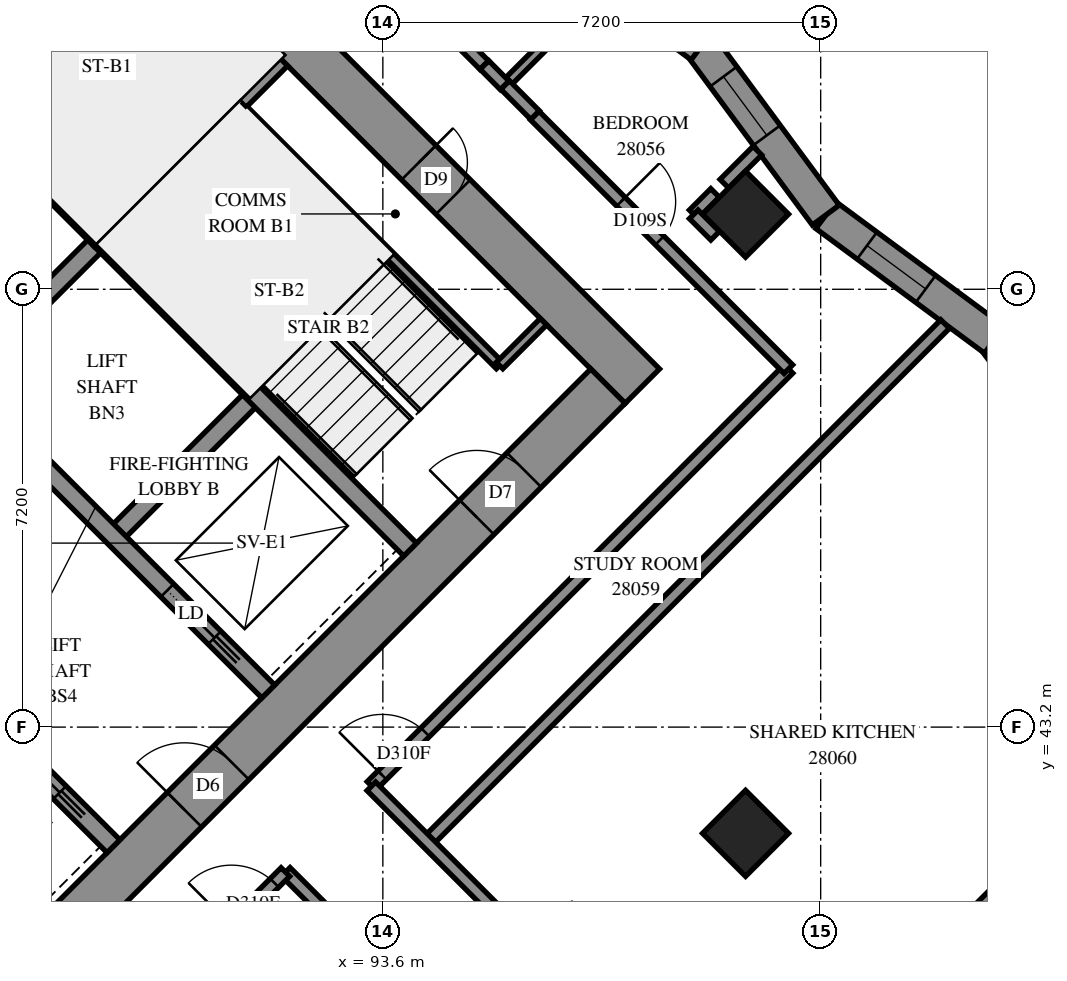
"""IFC4 building model, lengths in metres.
Left out: names, types, materials, properties, quantities, classifications, styles, units other than length and angle.
Written with IfcOpenShell. Run it as: python <this file> out.ifc"""

import sys

from ifc_helpers import new_model, si_unit, direction, frame, frame_2d, origin, origin_2d, place, context, subcontext, project, spatial, polyline, rectangle, outline, extrude, element, fill, save


model = new_model("IFC4")
c1 = context("Model", 3, precision=1e-05, world=origin(), true_north=direction((0.0, 1.0)))
c2 = subcontext(c1, "Body", "Model", "MODEL_VIEW")
j1 = project(units=[si_unit("LENGTHUNIT", "METRE"), si_unit("PLANEANGLEUNIT", "RADIAN")], contexts=[c1])
p1 = place(None, origin())
s1 = spatial("IfcSite", under=j1, at=p1, CompositionType="ELEMENT")
p2 = place(p1, origin())
s2 = spatial("IfcBuilding", under=s1, at=p2, CompositionType="ELEMENT")
p3 = place(p2, frame((0.0, 0.0, 105.0)))
s3 = spatial("IfcBuildingStorey", under=s2, at=p3, CompositionType="ELEMENT", Elevation=105.0)
for number, where, z_axis, x_axis in (
    (1, (99.565, 51.635, 0.0), (0.0, 0.0, 1.0), (0.707, -0.707, 0.0)),
    (2, (99.565, 41.453, 0.0), (0.0, 0.0, 1.0), (0.707, -0.707, 0.0)),
):
    element("IfcColumn", number, at=place(p3, frame(where, z_axis=z_axis, x_axis=x_axis)), inside=s3, PredefinedType="COLUMN", context=c2, shape_type="SweptSolid", body=[
        extrude(rectangle(XDim=1.0, YDim=1.0, at=origin_2d()), origin(), (0.0, 0.0, 1.0), 3.1),
    ])
p4 = place(p3, frame((86.554, 60.121, -0.3), z_axis=(0.0, 0.0, 1.0), x_axis=(0.7071067812, -0.7071067812, 0.0)))
e3 = element("IfcWall", 3, at=p4, inside=s3, PredefinedType="SHEAR", context=c2, shape_type="SweptSolid", body=[
    extrude(rectangle(XDim=16.0, YDim=0.8, at=frame_2d((8.0, 0.0))), origin(), (0.0, 0.0, 1.0), 2.7),
])
p5 = place(p4, frame((10.8, 0.0, 0.3)))
e4 = element("IfcOpeningElement", 4, at=p5, cuts=e3, PredefinedType="OPENING", context=c2, shape_type="SweptSolid", body=[
    extrude(rectangle(XDim=0.8, YDim=2.1, at=frame_2d((0.4, 1.05))), frame((0.0, 0.41, 0.0), z_axis=(0.0, -1.0, 0.0), x_axis=(1.0, 0.0, 0.0)), (0.0, 0.0, 1.0), 0.82),
])
p6 = place(p3, frame((87.12, 38.625, -0.3), z_axis=(0.0, 0.0, 1.0), x_axis=(0.7071067812, 0.7071067812, 0.0)))
e5 = element("IfcWall", 5, at=p6, inside=s3, PredefinedType="SHEAR", context=c2, shape_type="SweptSolid", body=[
    extrude(rectangle(XDim=14.4, YDim=0.8, at=frame_2d((7.2, 0.0))), origin(), (0.0, 0.0, 1.0), 2.7),
])
p7 = place(p6, frame((4.55, 0.0, 0.3)))
e6 = element("IfcOpeningElement", 6, at=p7, cuts=e5, PredefinedType="OPENING", context=c2, shape_type="SweptSolid", body=[
    extrude(rectangle(XDim=1.1, YDim=2.1, at=frame_2d((0.55, 1.05))), frame((0.0, 0.41, 0.0), z_axis=(0.0, -1.0, 0.0), x_axis=(1.0, 0.0, 0.0)), (0.0, 0.0, 1.0), 0.82),
])
p8 = place(p6, frame((11.35, 0.0, 0.3)))
e7 = element("IfcOpeningElement", 7, at=p8, cuts=e5, PredefinedType="OPENING", context=c2, shape_type="SweptSolid", body=[
    extrude(rectangle(XDim=1.1, YDim=2.1, at=frame_2d((0.55, 1.05))), frame((0.0, 0.41, 0.0), z_axis=(0.0, -1.0, 0.0), x_axis=(1.0, 0.0, 0.0)), (0.0, 0.0, 1.0), 0.82),
])
for number, where, z_axis, x_axis in (
    (8, (86.625, 48.878, 0.0), (0.0, 0.0, 1.0), (0.707, 0.707, 0.0)),
    (9, (89.17, 46.332, 0.0), (0.0, 0.0, 1.0), (0.707, 0.707, 0.0)),
):
    element("IfcWall", number, at=place(p3, frame(where, z_axis=z_axis, x_axis=x_axis)), inside=s3, PredefinedType="SOLIDWALL", context=c2, shape_type="SweptSolid", body=[
        extrude(rectangle(XDim=3.3, YDim=0.3, at=frame_2d((1.65, 0.0))), origin(), (0.0, 0.0, 1.0), 3.1),
    ])
p9 = place(p3, frame((78.988, 51.423, 0.0), z_axis=(0.0, 0.0, 1.0), x_axis=(0.7071067812, -0.7071067812, 0.0)))
e10 = element("IfcWall", 10, at=p9, inside=s3, PredefinedType="SOLIDWALL", context=c2, shape_type="SweptSolid", body=[
    extrude(rectangle(XDim=14.4, YDim=0.3, at=frame_2d((7.2, 0.0))), origin(), (0.0, 0.0, 1.0), 3.1),
])
p10 = place(p9, frame((1.25, 0.0, 0.0)))
e11 = element("IfcOpeningElement", 11, at=p10, cuts=e10, PredefinedType="OPENING", context=c2, shape_type="SweptSolid", body=[
    extrude(rectangle(XDim=1.1, YDim=2.1, at=frame_2d((0.55, 1.05))), frame((0.0, 0.16, 0.0), z_axis=(0.0, -1.0, 0.0), x_axis=(1.0, 0.0, 0.0)), (0.0, 0.0, 1.0), 0.32),
])
p11 = place(p9, frame((4.85, 0.0, 0.0)))
e12 = element("IfcOpeningElement", 12, at=p11, cuts=e10, PredefinedType="OPENING", context=c2, shape_type="SweptSolid", body=[
    extrude(rectangle(XDim=1.1, YDim=2.1, at=frame_2d((0.55, 1.05))), frame((0.0, 0.16, 0.0), z_axis=(0.0, -1.0, 0.0), x_axis=(1.0, 0.0, 0.0)), (0.0, 0.0, 1.0), 0.32),
])
p12 = place(p9, frame((8.45, 0.0, 0.0)))
e13 = element("IfcOpeningElement", 13, at=p12, cuts=e10, PredefinedType="OPENING", context=c2, shape_type="SweptSolid", body=[
    extrude(rectangle(XDim=1.1, YDim=2.1, at=frame_2d((0.55, 1.05))), frame((0.0, 0.16, 0.0), z_axis=(0.0, -1.0, 0.0), x_axis=(1.0, 0.0, 0.0)), (0.0, 0.0, 1.0), 0.32),
])
p13 = place(p9, frame((12.05, 0.0, 0.0)))
e14 = element("IfcOpeningElement", 14, at=p13, cuts=e10, PredefinedType="OPENING", context=c2, shape_type="SweptSolid", body=[
    extrude(rectangle(XDim=1.1, YDim=2.1, at=frame_2d((0.55, 1.05))), frame((0.0, 0.16, 0.0), z_axis=(0.0, -1.0, 0.0), x_axis=(1.0, 0.0, 0.0)), (0.0, 0.0, 1.0), 0.32),
])
p14 = place(p3, frame((81.534, 53.969, 0.0), z_axis=(0.0, 0.0, 1.0), x_axis=(0.707103309, -0.7071102534, 0.0)))
e15 = element("IfcWall", 15, at=p14, inside=s3, PredefinedType="SOLIDWALL", context=c2, shape_type="SweptSolid", body=[
    extrude(rectangle(XDim=14.4, YDim=0.3, at=frame_2d((7.2, 0.0))), origin(), (0.0, 0.0, 1.0), 3.1),
])
p15 = place(p14, frame((12.05, 0.0, 0.0)))
e16 = element("IfcOpeningElement", 16, at=p15, cuts=e15, PredefinedType="OPENING", context=c2, shape_type="SweptSolid", body=[
    extrude(rectangle(XDim=1.1, YDim=2.1, at=frame_2d((0.55, 1.05))), frame((0.0, 0.16, 0.0), z_axis=(0.0, -1.0, 0.0), x_axis=(1.0, 0.0, 0.0)), (0.0, 0.0, 1.0), 0.32),
])
for number, where, z_axis, x_axis in (
    (17, (83.867, 56.302, 0.0), (0.0, 0.0, 1.0), (0.707, -0.707, 0.0)),
    (18, (88.958, 51.211, 0.0), (0.0, 0.0, 1.0), (0.707, -0.707, 0.0)),
):
    element("IfcWall", number, at=place(p3, frame(where, z_axis=z_axis, x_axis=x_axis)), inside=s3, PredefinedType="SOLIDWALL", context=c2, shape_type="SweptSolid", body=[
        extrude(rectangle(XDim=7.2, YDim=0.3, at=frame_2d((3.6, 0.0))), origin(), (0.0, 0.0, 1.0), 3.1),
    ])
p16 = place(p3, frame((88.958, 51.211, 0.0), z_axis=(0.0, 0.0, 1.0), x_axis=(0.7071067812, 0.7071067812, 0.0)))
e19 = element("IfcWall", 19, at=p16, inside=s3, PredefinedType="SOLIDWALL", context=c2, shape_type="SweptSolid", body=[
    extrude(rectangle(XDim=4.2, YDim=0.3, at=frame_2d((2.1, 0.0))), origin(), (0.0, 0.0, 1.0), 3.1),
])
p17 = place(p3, frame((105.708, 46.796, 0.0), z_axis=(0.0, 0.0, 1.0), x_axis=(-0.5943307397, 0.8042207234, 0.0)))
e20 = element("IfcWall", 20, at=p17, inside=s3, PredefinedType="SOLIDWALL", context=c2, shape_type="SweptSolid", body=[
    extrude(outline(polyline([(0.041, -0.275), (3.491, -0.275), (3.408, 0.275), (-0.041, 0.275), (0.041, -0.275)])), origin(), (0.0, 0.0, 1.0), 3.1),
])
p18 = place(p17, frame((1.29, 0.0, 0.5)))
e21 = element("IfcOpeningElement", 21, at=p18, cuts=e20, PredefinedType="OPENING", context=c2, shape_type="SweptSolid", body=[
    extrude(rectangle(XDim=1.2, YDim=2.45, at=frame_2d((0.6, 1.225))), frame((0.0, 0.285, 0.0), z_axis=(0.0, -1.0, 0.0), x_axis=(1.0, 0.0, 0.0)), (0.0, 0.0, 1.0), 0.57),
])
p19 = place(p3, frame((103.658, 49.57, 0.0), z_axis=(0.0, 0.0, 1.0), x_axis=(-0.8042207234, 0.5943307397, 0.0)))
e22 = element("IfcWall", 22, at=p19, inside=s3, PredefinedType="SOLIDWALL", context=c2, shape_type="SweptSolid", body=[
    extrude(outline(polyline([(-0.041, -0.275), (3.408, -0.275), (3.491, 0.275), (0.041, 0.275), (-0.041, -0.275)])), origin(), (0.0, 0.0, 1.0), 3.1),
])
p20 = place(p19, frame((1.406, 0.0, 0.5)))
e23 = element("IfcOpeningElement", 23, at=p20, cuts=e22, PredefinedType="OPENING", context=c2, shape_type="SweptSolid", body=[
    extrude(rectangle(XDim=1.2, YDim=2.45, at=frame_2d((0.6, 1.225))), frame((0.0, 0.285, 0.0), z_axis=(0.0, -1.0, 0.0), x_axis=(1.0, 0.0, 0.0)), (0.0, 0.0, 1.0), 0.57),
])
p21 = place(p3, frame((100.884, 51.62, 0.0), z_axis=(0.0, 0.0, 1.0), x_axis=(-0.5943168833, 0.8042309632, 0.0)))
e24 = element("IfcWall", 24, at=p21, inside=s3, PredefinedType="SOLIDWALL", context=c2, shape_type="SweptSolid", body=[
    extrude(outline(polyline([(0.041, -0.275), (3.491, -0.275), (3.408, 0.275), (-0.041, 0.275), (0.041, -0.275)])), origin(), (0.0, 0.0, 1.0), 3.1),
])
p22 = place(p21, frame((1.631, 0.0, 0.5)))
e25 = element("IfcOpeningElement", 25, at=p22, cuts=e24, PredefinedType="OPENING", context=c2, shape_type="SweptSolid", body=[
    extrude(rectangle(XDim=1.2, YDim=2.45, at=frame_2d((0.6, 1.225))), frame((0.0, 0.285, 0.0), z_axis=(0.0, -1.0, 0.0), x_axis=(1.0, 0.0, 0.0)), (0.0, 0.0, 1.0), 0.57),
])
p23 = place(p3, frame((98.834, 54.394, 0.0), z_axis=(0.0, 0.0, 1.0), x_axis=(-0.8042309632, 0.5943168833, 0.0)))
e26 = element("IfcWall", 26, at=p23, inside=s3, PredefinedType="SOLIDWALL", context=c2, shape_type="SweptSolid", body=[
    extrude(outline(polyline([(-0.041, -0.275), (3.408, -0.275), (3.491, 0.275), (0.041, 0.275), (-0.041, -0.275)])), origin(), (0.0, 0.0, 1.0), 3.1),
])
p24 = place(p23, frame((0.422, 0.0, 0.5)))
e27 = element("IfcOpeningElement", 27, at=p24, cuts=e26, PredefinedType="OPENING", context=c2, shape_type="SweptSolid", body=[
    extrude(rectangle(XDim=1.2, YDim=2.45, at=frame_2d((0.6, 1.225))), frame((0.0, 0.285, 0.0), z_axis=(0.0, -1.0, 0.0), x_axis=(1.0, 0.0, 0.0)), (0.0, 0.0, 1.0), 0.57),
])
p25 = place(p23, frame((2.097, 0.0, 0.45)))
e28 = element("IfcOpeningElement", 28, at=p25, cuts=e26, PredefinedType="OPENING", context=c2, shape_type="SweptSolid", body=[
    extrude(rectangle(XDim=1.0, YDim=2.5, at=frame_2d((0.5, 1.25))), frame((0.0, 0.285, 0.0), z_axis=(0.0, -1.0, 0.0), x_axis=(1.0, 0.0, 0.0)), (0.0, 0.0, 1.0), 0.57),
])
p26 = place(p3, frame((91.313, 53.354, 0.0), z_axis=(0.0, 0.0, 1.0), x_axis=(0.7071067812, -0.7071067812, 0.0)))
e29 = element("IfcWall", 29, at=p26, inside=s3, PredefinedType="PARTITIONING", context=c2, shape_type="SweptSolid", body=[
    extrude(rectangle(XDim=5.95, YDim=0.15, at=frame_2d((2.975, 0.0))), origin(), (0.0, 0.0, 1.0), 3.1),
])
p27 = place(p3, frame((95.52, 49.146, 0.0), z_axis=(0.0, 0.0, 1.0), x_axis=(0.7071067812, 0.7071067812, 0.0)))
e30 = element("IfcWall", 30, at=p27, inside=s3, PredefinedType="PARTITIONING", context=c2, shape_type="SweptSolid", body=[
    extrude(rectangle(XDim=1.02, YDim=0.15, at=frame_2d((0.51, 0.0))), origin(), (0.0, 0.0, 1.0), 3.1),
])
p28 = place(p3, frame((92.004, 40.819, 0.0), z_axis=(0.0, 0.0, 1.0), x_axis=(0.7071067812, -0.7071067812, 0.0)))
e31 = element("IfcWall", 31, at=p28, inside=s3, PredefinedType="PARTITIONING", context=c2, shape_type="SweptSolid", body=[
    extrude(rectangle(XDim=19.298, YDim=0.2, at=frame_2d((9.649, 0.0))), origin(), (0.0, 0.0, 1.0), 3.1),
])
p29 = place(p28, frame((3.489, 0.0, 0.0)))
e32 = element("IfcOpeningElement", 32, at=p29, cuts=e31, PredefinedType="OPENING", context=c2, shape_type="SweptSolid", body=[
    extrude(rectangle(XDim=0.9, YDim=2.1, at=frame_2d((0.45, 1.05))), frame((0.0, 0.11, 0.0), z_axis=(0.0, -1.0, 0.0), x_axis=(1.0, 0.0, 0.0)), (0.0, 0.0, 1.0), 0.22),
])
p30 = place(p28, frame((9.319, 0.0, 0.0)))
e33 = element("IfcOpeningElement", 33, at=p30, cuts=e31, PredefinedType="OPENING", context=c2, shape_type="SweptSolid", body=[
    extrude(rectangle(XDim=0.9, YDim=2.1, at=frame_2d((0.45, 1.05))), frame((0.0, 0.11, 0.0), z_axis=(0.0, -1.0, 0.0), x_axis=(1.0, 0.0, 0.0)), (0.0, 0.0, 1.0), 0.22),
])
p31 = place(p28, frame((15.961, 0.0, 0.0)))
e34 = element("IfcOpeningElement", 34, at=p31, cuts=e31, PredefinedType="OPENING", context=c2, shape_type="SweptSolid", body=[
    extrude(rectangle(XDim=0.9, YDim=2.1, at=frame_2d((0.45, 1.05))), frame((0.0, 0.11, 0.0), z_axis=(0.0, -1.0, 0.0), x_axis=(1.0, 0.0, 0.0)), (0.0, 0.0, 1.0), 0.22),
])
p32 = place(p3, frame((99.423, 36.221, 0.0), z_axis=(0.0, 0.0, 1.0), x_axis=(0.7071067812, 0.7071067812, 0.0)))
e35 = element("IfcWall", 35, at=p32, inside=s3, PredefinedType="PARTITIONING", context=c2, shape_type="SweptSolid", body=[
    extrude(rectangle(XDim=12.099, YDim=0.2, at=frame_2d((6.049, 0.0))), origin(), (0.0, 0.0, 1.0), 3.1),
])
p33 = place(p3, frame((94.331, 41.313, 0.0), z_axis=(0.0, 0.0, 1.0), x_axis=(0.7071109333, 0.7071026291, 0.0)))
e36 = element("IfcWall", 36, at=p33, inside=s3, PredefinedType="PARTITIONING", context=c2, shape_type="SweptSolid", body=[
    extrude(rectangle(XDim=12.042, YDim=0.2, at=frame_2d((6.021, 0.0))), origin(), (0.0, 0.0, 1.0), 3.1),
])
p34 = place(p3, frame((87.894, 61.461, 0.0), z_axis=(0.0, 0.0, 1.0), x_axis=(0.7071067812, -0.7071067812, 0.0)))
e37 = element("IfcWall", 37, at=p34, inside=s3, PredefinedType="PARTITIONING", context=c2, shape_type="SweptSolid", body=[
    extrude(rectangle(XDim=10.428, YDim=0.2, at=frame_2d((5.214, 0.0))), origin(), (0.0, 0.0, 1.0), 3.1),
])
p35 = place(p34, frame((6.39, 0.0, 0.0)))
e38 = element("IfcOpeningElement", 38, at=p35, cuts=e37, PredefinedType="OPENING", context=c2, shape_type="SweptSolid", body=[
    extrude(rectangle(XDim=0.9, YDim=2.1, at=frame_2d((0.45, 1.05))), frame((0.0, 0.11, 0.0), z_axis=(0.0, -1.0, 0.0), x_axis=(1.0, 0.0, 0.0)), (0.0, 0.0, 1.0), 0.22),
])
p36 = place(p3, frame((93.413, 42.233, 0.0), z_axis=(0.0, 0.0, 1.0), x_axis=(0.7071067812, 0.7071067812, 0.0)))
e39 = element("IfcWall", 39, at=p36, inside=s3, PredefinedType="PARTITIONING", context=c2, shape_type="SweptSolid", body=[
    extrude(rectangle(XDim=9.699, YDim=0.2, at=frame_2d((4.849, 0.0))), origin(), (0.0, 0.0, 1.0), 3.1),
])
p37 = place(p36, frame((0.249, 0.0, 0.0)))
e40 = element("IfcOpeningElement", 40, at=p37, cuts=e39, PredefinedType="OPENING", context=c2, shape_type="SweptSolid", body=[
    extrude(rectangle(XDim=1.0, YDim=2.1, at=frame_2d((0.5, 1.05))), frame((0.0, 0.11, 0.0), z_axis=(0.0, -1.0, 0.0), x_axis=(1.0, 0.0, 0.0)), (0.0, 0.0, 1.0), 0.22),
])
p38 = place(p3, frame((93.411, 42.227, 0.0), z_axis=(0.0, 0.0, 1.0), x_axis=(0.7071067812, -0.7071067812, 0.0)))
e41 = element("IfcWall", 41, at=p38, inside=s3, PredefinedType="PARTITIONING", context=c2, shape_type="SweptSolid", body=[
    extrude(rectangle(XDim=8.499, YDim=0.2, at=frame_2d((4.25, 0.0))), origin(), (0.0, 0.0, 1.0), 3.1),
])
p39 = place(p38, frame((3.672, 0.0, 0.0)))
e42 = element("IfcOpeningElement", 42, at=p39, cuts=e41, PredefinedType="OPENING", context=c2, shape_type="SweptSolid", body=[
    extrude(rectangle(XDim=1.0, YDim=2.1, at=frame_2d((0.5, 1.05))), frame((0.0, 0.11, 0.0), z_axis=(0.0, -1.0, 0.0), x_axis=(1.0, 0.0, 0.0)), (0.0, 0.0, 1.0), 0.22),
])
p40 = place(p3, frame((86.835, 35.655, 0.0), z_axis=(0.0, 0.0, 1.0), x_axis=(0.7071067812, 0.7071067812, 0.0)))
e43 = element("IfcWall", 43, at=p40, inside=s3, PredefinedType="PARTITIONING", context=c2, shape_type="SweptSolid", body=[
    extrude(rectangle(XDim=7.3, YDim=0.2, at=frame_2d((3.65, 0.0))), origin(), (0.0, 0.0, 1.0), 3.1),
])
p41 = place(p40, frame((6.046, 0.0, 0.0)))
e44 = element("IfcOpeningElement", 44, at=p41, cuts=e43, PredefinedType="OPENING", context=c2, shape_type="SweptSolid", body=[
    extrude(rectangle(XDim=1.0, YDim=2.1, at=frame_2d((0.5, 1.05))), frame((0.0, 0.11, 0.0), z_axis=(0.0, -1.0, 0.0), x_axis=(1.0, 0.0, 0.0)), (0.0, 0.0, 1.0), 0.22),
])
p42 = place(p3, frame((96.097, 53.258, 0.0), z_axis=(0.0, 0.0, 1.0), x_axis=(0.7071067812, -0.7071067812, 0.0)))
e45 = element("IfcWall", 45, at=p42, inside=s3, PredefinedType="PARTITIONING", context=c2, shape_type="SweptSolid", body=[
    extrude(rectangle(XDim=5.9, YDim=0.2, at=frame_2d((2.95, 0.0))), origin(), (0.0, 0.0, 1.0), 3.1),
])
p43 = place(p42, frame((2.006, 0.0, 0.0)))
e46 = element("IfcOpeningElement", 46, at=p43, cuts=e45, PredefinedType="OPENING", context=c2, shape_type="SweptSolid", body=[
    extrude(rectangle(XDim=0.9, YDim=2.1, at=frame_2d((0.45, 1.05))), frame((0.0, 0.11, 0.0), z_axis=(0.0, -1.0, 0.0), x_axis=(1.0, 0.0, 0.0)), (0.0, 0.0, 1.0), 0.22),
])
p44 = place(p3, frame((95.605, 53.759, 0.0), z_axis=(0.0, 0.0, 1.0), x_axis=(0.7071067812, 0.7071067812, 0.0)))
e47 = element("IfcWall", 47, at=p44, inside=s3, PredefinedType="PARTITIONING", context=c2, shape_type="SweptSolid", body=[
    extrude(rectangle(XDim=2.179, YDim=0.15, at=frame_2d((1.089, 0.0))), origin(), (0.0, 0.0, 1.0), 3.1),
])
p45 = place(p44, frame((0.997, 0.0, 0.0)))
e48 = element("IfcOpeningElement", 48, at=p45, cuts=e47, PredefinedType="OPENING", context=c2, shape_type="SweptSolid", body=[
    extrude(rectangle(XDim=0.8, YDim=2.1, at=frame_2d((0.4, 1.05))), frame((0.0, 0.085, 0.0), z_axis=(0.0, -1.0, 0.0), x_axis=(1.0, 0.0, 0.0)), (0.0, 0.0, 1.0), 0.17),
])
p46 = place(p3, frame((99.216, 52.136, 0.0), z_axis=(0.0, 0.0, 1.0), x_axis=(0.7071067812, 0.7071067812, 0.0)))
e49 = element("IfcWall", 49, at=p46, inside=s3, PredefinedType="PARTITIONING", context=c2, shape_type="SweptSolid", body=[
    extrude(rectangle(XDim=0.768, YDim=0.2, at=frame_2d((0.384, 0.0))), origin(), (0.0, 0.0, 1.0), 3.1),
])
p47 = place(p3, frame((95.609, 53.761, 0.0), z_axis=(0.0, 0.0, 1.0), x_axis=(0.7056768426, -0.7085338339, 0.0)))
e50 = element("IfcWall", 50, at=p47, inside=s3, PredefinedType="PARTITIONING", context=c2, shape_type="SweptSolid", body=[
    extrude(rectangle(XDim=0.7, YDim=0.2, at=frame_2d((0.35, 0.0))), origin(), (0.0, 0.0, 1.0), 3.1),
])
for number, where, z_axis, x_axis in (
    (51, (98.712, 51.632, 0.0), (0.0, 0.0, 1.0), (0.707, 0.707, 0.0)),
    (52, (98.713, 51.633, 0.0), (0.0, 0.0, 1.0), (0.707, -0.707, 0.0)),
):
    element("IfcWall", number, at=place(p3, frame(where, z_axis=z_axis, x_axis=x_axis)), inside=s3, PredefinedType="PARTITIONING", context=c2, shape_type="SweptSolid", body=[
        extrude(rectangle(XDim=0.498, YDim=0.2, at=frame_2d((0.249, 0.0))), origin(), (0.0, 0.0, 1.0), 3.1),
    ])
p48 = place(p3, frame((95.271, 54.089, 0.0), z_axis=(0.0, 0.0, 1.0), x_axis=(0.7049801586, -0.7092270271, 0.0)))
e53 = element("IfcWall", 53, at=p48, inside=s3, PredefinedType="PARTITIONING", context=c2, shape_type="SweptSolid", body=[
    extrude(rectangle(XDim=0.471, YDim=0.2, at=frame_2d((0.235, 0.0))), origin(), (0.0, 0.0, 1.0), 3.1),
])
p49 = place(p20, origin())
e54 = element("IfcWindow", 54, at=p49, inside=s3, PartitioningType="SINGLE_PANEL", PredefinedType="WINDOW", context=c2, shape_type="SweptSolid", body=[
    extrude(rectangle(XDim=1.2, YDim=2.45, at=frame_2d((0.6, 1.225))), frame((0.0, 0.155, 0.0), z_axis=(0.0, -1.0, 0.0), x_axis=(1.0, 0.0, 0.0)), (0.0, 0.0, 1.0), 0.06),
])
fill(e23, e54)
p50 = place(p22, origin())
e55 = element("IfcWindow", 55, at=p50, inside=s3, PartitioningType="SINGLE_PANEL", PredefinedType="WINDOW", context=c2, shape_type="SweptSolid", body=[
    extrude(rectangle(XDim=1.2, YDim=2.45, at=frame_2d((0.6, 1.225))), frame((0.0, 0.155, 0.0), z_axis=(0.0, -1.0, 0.0), x_axis=(1.0, 0.0, 0.0)), (0.0, 0.0, 1.0), 0.06),
])
fill(e25, e55)
p51 = place(p5, origin())
e56 = element("IfcDoor", 56, at=p51, inside=s3, OperationType="SINGLE_SWING_RIGHT", PredefinedType="DOOR", context=c2, shape_type="SweptSolid", body=[
    extrude(rectangle(XDim=0.8, YDim=2.1, at=frame_2d((0.4, 1.05))), frame((0.0, -0.34, 0.0), z_axis=(0.0, -1.0, 0.0), x_axis=(1.0, 0.0, 0.0)), (0.0, 0.0, 1.0), 0.05),
])
fill(e4, e56)
p52 = place(p7, origin())
e57 = element("IfcDoor", 57, at=p52, inside=s3, OperationType="DOUBLE_DOOR_SINGLE_SWING", PredefinedType="DOOR", context=c2, shape_type="SweptSolid", body=[
    extrude(rectangle(XDim=1.1, YDim=2.1, at=frame_2d((0.55, 1.05))), frame((0.0, 0.025, 0.0), z_axis=(0.0, -1.0, 0.0), x_axis=(1.0, 0.0, 0.0)), (0.0, 0.0, 1.0), 0.05),
])
fill(e6, e57)
p53 = place(p8, origin())
e58 = element("IfcDoor", 58, at=p53, inside=s3, OperationType="SINGLE_SWING_RIGHT", PredefinedType="DOOR", context=c2, shape_type="SweptSolid", body=[
    extrude(rectangle(XDim=1.1, YDim=2.1, at=frame_2d((0.55, 1.05))), frame((0.0, 0.025, 0.0), z_axis=(0.0, -1.0, 0.0), x_axis=(1.0, 0.0, 0.0)), (0.0, 0.0, 1.0), 0.05),
])
fill(e7, e58)
p54 = place(p13, origin())
e59 = element("IfcDoor", 59, at=p54, inside=s3, OperationType="SLIDING_TO_RIGHT", PredefinedType="DOOR", context=c2, shape_type="SweptSolid", body=[
    extrude(rectangle(XDim=1.1, YDim=2.1, at=frame_2d((0.55, 1.05))), frame((0.0, 0.025, 0.0), z_axis=(0.0, -1.0, 0.0), x_axis=(1.0, 0.0, 0.0)), (0.0, 0.0, 1.0), 0.05),
])
fill(e14, e59)
p55 = place(p15, origin())
e60 = element("IfcDoor", 60, at=p55, inside=s3, OperationType="SLIDING_TO_RIGHT", PredefinedType="DOOR", context=c2, shape_type="SweptSolid", body=[
    extrude(rectangle(XDim=1.1, YDim=2.1, at=frame_2d((0.55, 1.05))), frame((0.0, 0.025, 0.0), z_axis=(0.0, -1.0, 0.0), x_axis=(1.0, 0.0, 0.0)), (0.0, 0.0, 1.0), 0.05),
])
fill(e16, e60)
p56 = place(p43, origin())
e61 = element("IfcDoor", 61, at=p56, inside=s3, OperationType="SINGLE_SWING_LEFT", PredefinedType="DOOR", context=c2, shape_type="SweptSolid", body=[
    extrude(rectangle(XDim=0.9, YDim=2.1, at=frame_2d((0.45, 1.05))), frame((0.0, 0.025, 0.0), z_axis=(0.0, -1.0, 0.0), x_axis=(1.0, 0.0, 0.0)), (0.0, 0.0, 1.0), 0.05),
])
fill(e46, e61)
p57 = place(p37, origin())
e62 = element("IfcDoor", 62, at=p57, inside=s3, OperationType="SINGLE_SWING_LEFT", PredefinedType="DOOR", context=c2, shape_type="SweptSolid", body=[
    extrude(rectangle(XDim=1.0, YDim=2.1, at=frame_2d((0.5, 1.05))), frame((0.0, 0.025, 0.0), z_axis=(0.0, -1.0, 0.0), x_axis=(1.0, 0.0, 0.0)), (0.0, 0.0, 1.0), 0.05),
])
fill(e40, e62)
p58 = place(p41, origin())
e63 = element("IfcDoor", 63, at=p58, inside=s3, OperationType="SINGLE_SWING_RIGHT", PredefinedType="DOOR", context=c2, shape_type="SweptSolid", body=[
    extrude(rectangle(XDim=1.0, YDim=2.1, at=frame_2d((0.5, 1.05))), frame((0.0, 0.025, 0.0), z_axis=(0.0, -1.0, 0.0), x_axis=(1.0, 0.0, 0.0)), (0.0, 0.0, 1.0), 0.05),
])
fill(e44, e63)
save(model, sys.argv[1])
